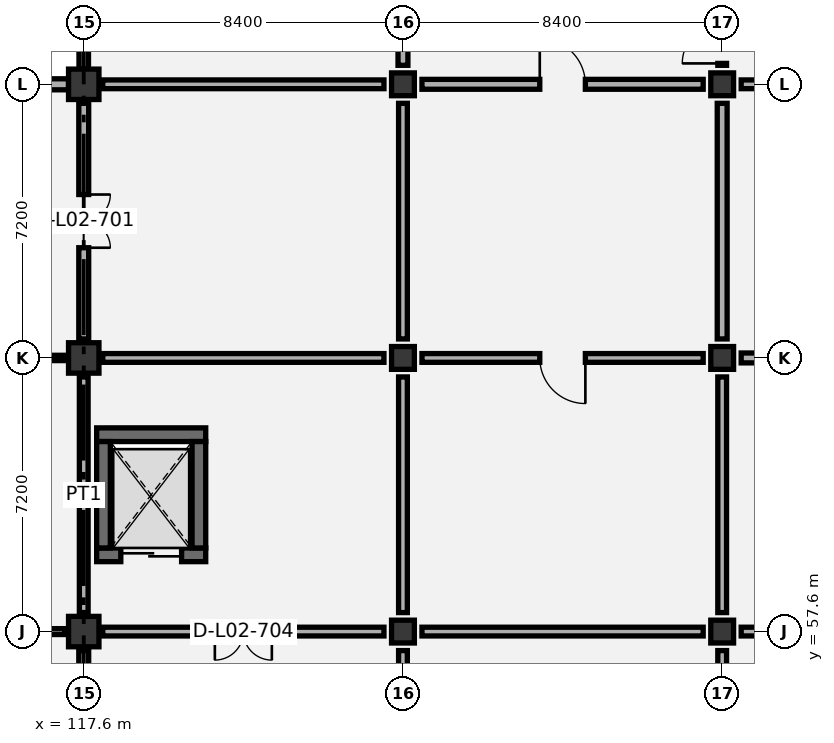
"""IFC4 building model, lengths in metres.
Left out: names, types, materials, properties, quantities, classifications, styles, units other than length and angle.
Written with IfcOpenShell. Run it as: python <this file> out.ifc"""

import sys

from ifc_helpers import new_model, si_unit, direction, frame, frame_2d, origin, origin_2d, place, context, subcontext, project, spatial, rectangle, extrude, element, fill, save


model = new_model("IFC4")
c1 = context("Model", 3, precision=1e-05, world=origin(), true_north=direction((0.0, 1.0)))
c2 = subcontext(c1, "Body", "Model", "MODEL_VIEW")
j1 = project(units=[si_unit("LENGTHUNIT", "METRE"), si_unit("PLANEANGLEUNIT", "RADIAN")], contexts=[c1])
p1 = place(None, origin())
s1 = spatial("IfcSite", under=j1, at=p1, CompositionType="ELEMENT")
p2 = place(p1, origin())
s2 = spatial("IfcBuilding", under=s1, at=p2, CompositionType="ELEMENT")
p3 = place(p2, frame((0.0, 0.0, 11.4)))
s3 = spatial("IfcBuildingStorey", under=s2, at=p3, CompositionType="ELEMENT", Elevation=11.4)
for number, where, z_axis, x_axis in (
    (1, (117.6, 57.6, 0.0), (0.0, 0.0, 1.0), (1.0, 0.0, 0.0)),
    (2, (117.6, 64.8, 0.0), (0.0, 0.0, 1.0), (1.0, 0.0, 0.0)),
    (3, (117.6, 72.0, 0.0), (0.0, 0.0, 1.0), (1.0, 0.0, 0.0)),
):
    element("IfcColumn", number, at=place(p3, frame(where, z_axis=z_axis, x_axis=x_axis)), inside=s3, PredefinedType="COLUMN", context=c2, shape_type="SweptSolid", body=[
        extrude(rectangle(XDim=0.8, YDim=0.8, at=origin_2d()), origin(), (0.0, 0.0, 1.0), 5.4),
    ])
for number, where, z_axis, x_axis in (
    (4, (126.0, 57.6, 0.0), (0.0, 0.0, 1.0), (1.0, 0.0, 0.0)),
    (5, (126.0, 64.8, 0.0), (0.0, 0.0, 1.0), (1.0, 0.0, 0.0)),
    (6, (126.0, 72.0, 0.0), (0.0, 0.0, 1.0), (1.0, 0.0, 0.0)),
    (7, (134.4, 57.6, 0.0), (0.0, 0.0, 1.0), (1.0, 0.0, 0.0)),
    (8, (134.4, 64.8, 0.0), (0.0, 0.0, 1.0), (1.0, 0.0, 0.0)),
    (9, (134.4, 72.0, 0.0), (0.0, 0.0, 1.0), (1.0, 0.0, 0.0)),
):
    element("IfcColumn", number, at=place(p3, frame(where, z_axis=z_axis, x_axis=x_axis)), inside=s3, PredefinedType="COLUMN", context=c2, shape_type="SweptSolid", body=[
        extrude(rectangle(XDim=0.6, YDim=0.6, at=origin_2d()), origin(), (0.0, 0.0, 1.0), 5.4),
    ])
p4 = place(p3, frame((117.94, 62.78, 0.0), z_axis=(0.0, 0.0, 1.0), x_axis=(1.0, 0.0, 0.0)))
e10 = element("IfcWall", 10, at=p4, inside=s3, PredefinedType="SHEAR", context=c2, shape_type="SweptSolid", body=[
    extrude(rectangle(XDim=2.87, YDim=0.36, at=frame_2d((1.435, 0.0))), origin(), (0.0, 0.0, 1.0), 5.1),
])
p5 = place(p3, frame((117.94, 59.62, 0.0), z_axis=(0.0, 0.0, 1.0), x_axis=(1.0, 0.0, 0.0)))
e11 = element("IfcWall", 11, at=p5, inside=s3, PredefinedType="SHEAR", context=c2, shape_type="SweptSolid", body=[
    extrude(rectangle(XDim=2.87, YDim=0.36, at=frame_2d((1.435, 0.0))), origin(), (0.0, 0.0, 1.0), 5.1),
])
p6 = place(p5, frame((0.635, 0.0, 0.0)))
e12 = element("IfcOpeningElement", 12, at=p6, cuts=e11, PredefinedType="OPENING", context=c2, shape_type="SweptSolid", body=[
    extrude(rectangle(XDim=1.6, YDim=2.25, at=frame_2d((0.8, 1.125))), frame((0.0, 0.19, 0.0), z_axis=(0.0, -1.0, 0.0), x_axis=(1.0, 0.0, 0.0)), (0.0, 0.0, 1.0), 0.38),
])
for number, where, z_axis, x_axis in (
    (13, (118.12, 59.8, 0.0), (0.0, 0.0, 1.0), (0.0, 1.0, 0.0)),
    (14, (120.63, 59.8, 0.0), (0.0, 0.0, 1.0), (0.0, 1.0, 0.0)),
):
    element("IfcWall", number, at=place(p3, frame(where, z_axis=z_axis, x_axis=x_axis)), inside=s3, PredefinedType="SHEAR", context=c2, shape_type="SweptSolid", body=[
        extrude(rectangle(XDim=2.8, YDim=0.36, at=frame_2d((1.4, 0.0))), origin(), (0.0, 0.0, 1.0), 5.1),
    ])
p7 = place(p3, frame((109.6, 72.0, 0.0), z_axis=(0.0, 0.0, 1.0), x_axis=(1.0, 0.0, 0.0)))
e15 = element("IfcWall", 15, at=p7, inside=s3, PredefinedType="SOLIDWALL", context=c2, shape_type="SweptSolid", body=[
    extrude(rectangle(XDim=7.6, YDim=0.29, at=frame_2d((3.8, 0.0))), origin(), (0.0, 0.0, 1.0), 4.445),
])
p8 = place(p7, frame((2.3, 0.0, 0.9)))
e16 = element("IfcOpeningElement", 16, at=p8, cuts=e15, PredefinedType="OPENING", context=c2, shape_type="SweptSolid", body=[
    extrude(rectangle(XDim=3.0, YDim=2.1, at=frame_2d((1.5, 1.05))), frame((0.0, 0.155, 0.0), z_axis=(0.0, -1.0, 0.0), x_axis=(1.0, 0.0, 0.0)), (0.0, 0.0, 1.0), 0.31),
])
p9 = place(p3, frame((117.6, 72.4, 0.0), z_axis=(0.0, 0.0, 1.0), x_axis=(0.0, 1.0, 0.0)))
e17 = element("IfcWall", 17, at=p9, inside=s3, PredefinedType="SOLIDWALL", context=c2, shape_type="SweptSolid", body=[
    extrude(rectangle(XDim=6.5, YDim=0.25, at=frame_2d((3.25, 0.0))), origin(), (0.0, 0.0, 1.0), 4.445),
])
p10 = place(p9, frame((1.75, 0.0, 0.9)))
e18 = element("IfcOpeningElement", 18, at=p10, cuts=e17, PredefinedType="OPENING", context=c2, shape_type="SweptSolid", body=[
    extrude(rectangle(XDim=3.0, YDim=2.1, at=frame_2d((1.5, 1.05))), frame((0.0, 0.135, 0.0), z_axis=(0.0, -1.0, 0.0), x_axis=(1.0, 0.0, 0.0)), (0.0, 0.0, 1.0), 0.27),
])
p11 = place(p3, frame((117.6, 50.9, 0.0), z_axis=(0.0, 0.0, 1.0), x_axis=(0.0, 1.0, 0.0)))
e19 = element("IfcWall", 19, at=p11, inside=s3, PredefinedType="PARTITIONING", context=c2, shape_type="SweptSolid", body=[
    extrude(rectangle(XDim=6.2, YDim=0.26, at=frame_2d((3.1, 0.0))), origin(), (0.0, 0.0, 1.0), 4.395),
])
p12 = place(p3, frame((109.7, 57.6, 0.0), z_axis=(0.0, 0.0, 1.0), x_axis=(1.0, 0.0, 0.0)))
e20 = element("IfcWall", 20, at=p12, inside=s3, PredefinedType="PARTITIONING", context=c2, shape_type="SweptSolid", body=[
    extrude(rectangle(XDim=7.4, YDim=0.155, at=frame_2d((3.7, 0.0))), origin(), (0.0, 0.0, 1.0), 4.345),
])
p13 = place(p12, frame((3.0, 0.0, 0.0)))
e21 = element("IfcOpeningElement", 21, at=p13, cuts=e20, PredefinedType="OPENING", context=c2, shape_type="SweptSolid", body=[
    extrude(rectangle(XDim=1.4, YDim=2.15, at=frame_2d((0.7, 1.075))), frame((0.0, 0.087, 0.0), z_axis=(0.0, -1.0, 0.0), x_axis=(1.0, 0.0, 0.0)), (0.0, 0.0, 1.0), 0.175),
])
p14 = place(p3, frame((117.6, 58.1, 0.0), z_axis=(0.0, 0.0, 1.0), x_axis=(0.0, 1.0, 0.0)))
e22 = element("IfcWall", 22, at=p14, inside=s3, PredefinedType="PARTITIONING", context=c2, shape_type="SweptSolid", body=[
    extrude(rectangle(XDim=6.2, YDim=0.23, at=frame_2d((3.1, 0.0))), origin(), (0.0, 0.0, 1.0), 4.695),
])
p15 = place(p3, frame((109.7, 64.8, 0.0), z_axis=(0.0, 0.0, 1.0), x_axis=(1.0, 0.0, 0.0)))
e23 = element("IfcWall", 23, at=p15, inside=s3, PredefinedType="PARTITIONING", context=c2, shape_type="SweptSolid", body=[
    extrude(rectangle(XDim=7.4, YDim=0.14, at=frame_2d((3.7, 0.0))), origin(), (0.0, 0.0, 1.0), 4.345),
])
p16 = place(p15, frame((2.85, 0.0, 0.0)))
e24 = element("IfcOpeningElement", 24, at=p16, cuts=e23, PredefinedType="OPENING", context=c2, shape_type="SweptSolid", body=[
    extrude(rectangle(XDim=1.7, YDim=2.25, at=frame_2d((0.85, 1.125))), frame((0.0, 0.08, 0.0), z_axis=(0.0, -1.0, 0.0), x_axis=(1.0, 0.0, 0.0)), (0.0, 0.0, 1.0), 0.16),
])
p17 = place(p3, frame((117.6, 65.3, 0.0), z_axis=(0.0, 0.0, 1.0), x_axis=(0.0, 1.0, 0.0)))
e25 = element("IfcWall", 25, at=p17, inside=s3, PredefinedType="PARTITIONING", context=c2, shape_type="SweptSolid", body=[
    extrude(rectangle(XDim=6.2, YDim=0.26, at=frame_2d((3.1, 0.0))), origin(), (0.0, 0.0, 1.0), 4.395),
])
p18 = place(p17, frame((2.4, 0.0, 0.0)))
e26 = element("IfcOpeningElement", 26, at=p18, cuts=e25, PredefinedType="OPENING", context=c2, shape_type="SweptSolid", body=[
    extrude(rectangle(XDim=1.4, YDim=2.15, at=frame_2d((0.7, 1.075))), frame((0.0, 0.14, 0.0), z_axis=(0.0, -1.0, 0.0), x_axis=(1.0, 0.0, 0.0)), (0.0, 0.0, 1.0), 0.28),
])
p19 = place(p3, frame((126.0, 50.9, 0.0), z_axis=(0.0, 0.0, 1.0), x_axis=(0.0, 1.0, 0.0)))
e27 = element("IfcWall", 27, at=p19, inside=s3, PredefinedType="PARTITIONING", context=c2, shape_type="SweptSolid", body=[
    extrude(rectangle(XDim=6.2, YDim=0.23, at=frame_2d((3.1, 0.0))), origin(), (0.0, 0.0, 1.0), 4.695),
])
p20 = place(p19, frame((0.05, 0.0, 0.0)))
e28 = element("IfcOpeningElement", 28, at=p20, cuts=e27, PredefinedType="OPENING", context=c2, shape_type="SweptSolid", body=[
    extrude(rectangle(XDim=1.05, YDim=2.15, at=frame_2d((0.525, 1.075))), frame((0.0, 0.125, 0.0), z_axis=(0.0, -1.0, 0.0), x_axis=(1.0, 0.0, 0.0)), (0.0, 0.0, 1.0), 0.25),
])
p21 = place(p3, frame((118.1, 57.6, 0.0), z_axis=(0.0, 0.0, 1.0), x_axis=(1.0, 0.0, 0.0)))
e29 = element("IfcWall", 29, at=p21, inside=s3, PredefinedType="PARTITIONING", context=c2, shape_type="SweptSolid", body=[
    extrude(rectangle(XDim=7.4, YDim=0.23, at=frame_2d((3.7, 0.0))), origin(), (0.0, 0.0, 1.0), 4.345),
])
p22 = place(p21, frame((2.95, 0.0, 0.0)))
e30 = element("IfcOpeningElement", 30, at=p22, cuts=e29, PredefinedType="OPENING", context=c2, shape_type="SweptSolid", body=[
    extrude(rectangle(XDim=1.5, YDim=2.15, at=frame_2d((0.75, 1.075))), frame((0.0, 0.125, 0.0), z_axis=(0.0, -1.0, 0.0), x_axis=(1.0, 0.0, 0.0)), (0.0, 0.0, 1.0), 0.25),
])
p23 = place(p3, frame((126.0, 58.1, 0.0), z_axis=(0.0, 0.0, 1.0), x_axis=(0.0, 1.0, 0.0)))
e31 = element("IfcWall", 31, at=p23, inside=s3, PredefinedType="PARTITIONING", context=c2, shape_type="SweptSolid", body=[
    extrude(rectangle(XDim=6.2, YDim=0.23, at=frame_2d((3.1, 0.0))), origin(), (0.0, 0.0, 1.0), 4.395),
])
p24 = place(p3, frame((118.1, 64.8, 0.0), z_axis=(0.0, 0.0, 1.0), x_axis=(1.0, 0.0, 0.0)))
e32 = element("IfcWall", 32, at=p24, inside=s3, PredefinedType="PARTITIONING", context=c2, shape_type="SweptSolid", body=[
    extrude(rectangle(XDim=7.4, YDim=0.23, at=frame_2d((3.7, 0.0))), origin(), (0.0, 0.0, 1.0), 4.345),
])
p25 = place(p3, frame((126.0, 65.3, 0.0), z_axis=(0.0, 0.0, 1.0), x_axis=(0.0, 1.0, 0.0)))
e33 = element("IfcWall", 33, at=p25, inside=s3, PredefinedType="PARTITIONING", context=c2, shape_type="SweptSolid", body=[
    extrude(rectangle(XDim=6.2, YDim=0.23, at=frame_2d((3.1, 0.0))), origin(), (0.0, 0.0, 1.0), 4.805),
])
p26 = place(p3, frame((118.1, 72.0, 0.0), z_axis=(0.0, 0.0, 1.0), x_axis=(1.0, 0.0, 0.0)))
e34 = element("IfcWall", 34, at=p26, inside=s3, PredefinedType="PARTITIONING", context=c2, shape_type="SweptSolid", body=[
    extrude(rectangle(XDim=7.4, YDim=0.23, at=frame_2d((3.7, 0.0))), origin(), (0.0, 0.0, 1.0), 4.345),
])
p27 = place(p3, frame((126.0, 72.5, 0.0), z_axis=(0.0, 0.0, 1.0), x_axis=(0.0, 1.0, 0.0)))
e35 = element("IfcWall", 35, at=p27, inside=s3, PredefinedType="PARTITIONING", context=c2, shape_type="SweptSolid", body=[
    extrude(rectangle(XDim=6.2, YDim=0.26, at=frame_2d((3.1, 0.0))), origin(), (0.0, 0.0, 1.0), 4.395),
])
p28 = place(p27, frame((2.5, 0.0, 0.0)))
e36 = element("IfcOpeningElement", 36, at=p28, cuts=e35, PredefinedType="OPENING", context=c2, shape_type="SweptSolid", body=[
    extrude(rectangle(XDim=1.2, YDim=2.1, at=frame_2d((0.6, 1.05))), frame((0.0, 0.14, 0.0), z_axis=(0.0, -1.0, 0.0), x_axis=(1.0, 0.0, 0.0)), (0.0, 0.0, 1.0), 0.28),
])
p29 = place(p3, frame((134.4, 50.9, 0.0), z_axis=(0.0, 0.0, 1.0), x_axis=(0.0, 1.0, 0.0)))
e37 = element("IfcWall", 37, at=p29, inside=s3, PredefinedType="PARTITIONING", context=c2, shape_type="SweptSolid", body=[
    extrude(rectangle(XDim=6.2, YDim=0.23, at=frame_2d((3.1, 0.0))), origin(), (0.0, 0.0, 1.0), 4.395),
])
p30 = place(p3, frame((126.5, 57.6, 0.0), z_axis=(0.0, 0.0, 1.0), x_axis=(1.0, 0.0, 0.0)))
e38 = element("IfcWall", 38, at=p30, inside=s3, PredefinedType="PARTITIONING", context=c2, shape_type="SweptSolid", body=[
    extrude(rectangle(XDim=7.4, YDim=0.23, at=frame_2d((3.7, 0.0))), origin(), (0.0, 0.0, 1.0), 4.345),
])
p31 = place(p3, frame((134.4, 58.1, 0.0), z_axis=(0.0, 0.0, 1.0), x_axis=(0.0, 1.0, 0.0)))
e39 = element("IfcWall", 39, at=p31, inside=s3, PredefinedType="PARTITIONING", context=c2, shape_type="SweptSolid", body=[
    extrude(rectangle(XDim=6.2, YDim=0.23, at=frame_2d((3.1, 0.0))), origin(), (0.0, 0.0, 1.0), 4.805),
])
p32 = place(p3, frame((126.5, 64.8, 0.0), z_axis=(0.0, 0.0, 1.0), x_axis=(1.0, 0.0, 0.0)))
e40 = element("IfcWall", 40, at=p32, inside=s3, PredefinedType="PARTITIONING", context=c2, shape_type="SweptSolid", body=[
    extrude(rectangle(XDim=7.4, YDim=0.23, at=frame_2d((3.7, 0.0))), origin(), (0.0, 0.0, 1.0), 4.345),
])
p33 = place(p32, frame((3.1, 0.0, 0.0)))
e41 = element("IfcOpeningElement", 41, at=p33, cuts=e40, PredefinedType="OPENING", context=c2, shape_type="SweptSolid", body=[
    extrude(rectangle(XDim=1.2, YDim=2.1, at=frame_2d((0.6, 1.05))), frame((0.0, 0.125, 0.0), z_axis=(0.0, -1.0, 0.0), x_axis=(1.0, 0.0, 0.0)), (0.0, 0.0, 1.0), 0.25),
])
p34 = place(p3, frame((134.4, 65.3, 0.0), z_axis=(0.0, 0.0, 1.0), x_axis=(0.0, 1.0, 0.0)))
e42 = element("IfcWall", 42, at=p34, inside=s3, PredefinedType="PARTITIONING", context=c2, shape_type="SweptSolid", body=[
    extrude(rectangle(XDim=6.2, YDim=0.26, at=frame_2d((3.1, 0.0))), origin(), (0.0, 0.0, 1.0), 4.395),
])
p35 = place(p3, frame((126.5, 72.0, 0.0), z_axis=(0.0, 0.0, 1.0), x_axis=(1.0, 0.0, 0.0)))
e43 = element("IfcWall", 43, at=p35, inside=s3, PredefinedType="PARTITIONING", context=c2, shape_type="SweptSolid", body=[
    extrude(rectangle(XDim=7.4, YDim=0.26, at=frame_2d((3.7, 0.0))), origin(), (0.0, 0.0, 1.0), 4.345),
])
p36 = place(p35, frame((3.1, 0.0, 0.0)))
e44 = element("IfcOpeningElement", 44, at=p36, cuts=e43, PredefinedType="OPENING", context=c2, shape_type="SweptSolid", body=[
    extrude(rectangle(XDim=1.2, YDim=2.1, at=frame_2d((0.6, 1.05))), frame((0.0, 0.14, 0.0), z_axis=(0.0, -1.0, 0.0), x_axis=(1.0, 0.0, 0.0)), (0.0, 0.0, 1.0), 0.28),
])
p37 = place(p3, frame((134.4, 72.5, 0.0), z_axis=(0.0, 0.0, 1.0), x_axis=(0.0, 1.0, 0.0)))
e45 = element("IfcWall", 45, at=p37, inside=s3, PredefinedType="PARTITIONING", context=c2, shape_type="SweptSolid", body=[
    extrude(rectangle(XDim=6.2, YDim=0.23, at=frame_2d((3.1, 0.0))), origin(), (0.0, 0.0, 1.0), 4.595),
])
p38 = place(p37, frame((0.05, 0.0, 0.0)))
e46 = element("IfcOpeningElement", 46, at=p38, cuts=e45, PredefinedType="OPENING", context=c2, shape_type="SweptSolid", body=[
    extrude(rectangle(XDim=1.05, YDim=2.15, at=frame_2d((0.525, 1.075))), frame((0.0, 0.125, 0.0), z_axis=(0.0, -1.0, 0.0), x_axis=(1.0, 0.0, 0.0)), (0.0, 0.0, 1.0), 0.25),
])
p39 = place(p3, frame((134.9, 57.6, 0.0), z_axis=(0.0, 0.0, 1.0), x_axis=(1.0, 0.0, 0.0)))
e47 = element("IfcWall", 47, at=p39, inside=s3, PredefinedType="PARTITIONING", context=c2, shape_type="SweptSolid", body=[
    extrude(rectangle(XDim=7.4, YDim=0.23, at=frame_2d((3.7, 0.0))), origin(), (0.0, 0.0, 1.0), 4.345),
])
p40 = place(p39, frame((3.1, 0.0, 0.0)))
e48 = element("IfcOpeningElement", 48, at=p40, cuts=e47, PredefinedType="OPENING", context=c2, shape_type="SweptSolid", body=[
    extrude(rectangle(XDim=1.2, YDim=2.1, at=frame_2d((0.6, 1.05))), frame((0.0, 0.125, 0.0), z_axis=(0.0, -1.0, 0.0), x_axis=(1.0, 0.0, 0.0)), (0.0, 0.0, 1.0), 0.25),
])
p41 = place(p3, frame((134.9, 64.8, 0.0), z_axis=(0.0, 0.0, 1.0), x_axis=(1.0, 0.0, 0.0)))
e49 = element("IfcWall", 49, at=p41, inside=s3, PredefinedType="PARTITIONING", context=c2, shape_type="SweptSolid", body=[
    extrude(rectangle(XDim=7.4, YDim=0.26, at=frame_2d((3.7, 0.0))), origin(), (0.0, 0.0, 1.0), 4.345),
])
p42 = place(p41, frame((3.1, 0.0, 0.0)))
e50 = element("IfcOpeningElement", 50, at=p42, cuts=e49, PredefinedType="OPENING", context=c2, shape_type="SweptSolid", body=[
    extrude(rectangle(XDim=1.2, YDim=2.1, at=frame_2d((0.6, 1.05))), frame((0.0, 0.14, 0.0), z_axis=(0.0, -1.0, 0.0), x_axis=(1.0, 0.0, 0.0)), (0.0, 0.0, 1.0), 0.28),
])
p43 = place(p3, frame((134.9, 72.0, 0.0), z_axis=(0.0, 0.0, 1.0), x_axis=(1.0, 0.0, 0.0)))
e51 = element("IfcWall", 51, at=p43, inside=s3, PredefinedType="PARTITIONING", context=c2, shape_type="SweptSolid", body=[
    extrude(rectangle(XDim=7.4, YDim=0.23, at=frame_2d((3.7, 0.0))), origin(), (0.0, 0.0, 1.0), 4.345),
])
p44 = place(p43, frame((2.95, 0.0, 0.0)))
e52 = element("IfcOpeningElement", 52, at=p44, cuts=e51, PredefinedType="OPENING", context=c2, shape_type="SweptSolid", body=[
    extrude(rectangle(XDim=1.5, YDim=2.15, at=frame_2d((0.75, 1.075))), frame((0.0, 0.125, 0.0), z_axis=(0.0, -1.0, 0.0), x_axis=(1.0, 0.0, 0.0)), (0.0, 0.0, 1.0), 0.25),
])
p45 = place(p6, origin())
e53 = element("IfcDoor", 53, at=p45, inside=s3, OperationType="DOUBLE_DOOR_SLIDING", PredefinedType="DOOR", context=c2, shape_type="SweptSolid", body=[
    extrude(rectangle(XDim=1.6, YDim=2.25, at=frame_2d((0.8, 1.125))), frame((0.0, 0.025, 0.0), z_axis=(0.0, -1.0, 0.0), x_axis=(1.0, 0.0, 0.0)), (0.0, 0.0, 1.0), 0.05),
])
fill(e12, e53)
p46 = place(p18, frame((1.4, 0.0, 0.0), z_axis=(0.0, 0.0, 1.0), x_axis=(-1.0, 0.0, 0.0)))
e54 = element("IfcDoor", 54, at=p46, inside=s3, OperationType="DOUBLE_DOOR_SINGLE_SWING", PredefinedType="DOOR", context=c2, shape_type="SweptSolid", body=[
    extrude(rectangle(XDim=1.4, YDim=2.15, at=frame_2d((0.7, 1.075))), frame((0.0, 0.025, 0.0), z_axis=(0.0, -1.0, 0.0), x_axis=(1.0, 0.0, 0.0)), (0.0, 0.0, 1.0), 0.05),
])
fill(e26, e54)
p47 = place(p22, frame((1.5, 0.0, 0.0), z_axis=(0.0, 0.0, 1.0), x_axis=(-1.0, 0.0, 0.0)))
e55 = element("IfcDoor", 55, at=p47, inside=s3, OperationType="DOUBLE_DOOR_SINGLE_SWING", PredefinedType="DOOR", context=c2, shape_type="SweptSolid", body=[
    extrude(rectangle(XDim=1.5, YDim=2.15, at=frame_2d((0.75, 1.075))), frame((0.0, 0.025, 0.0), z_axis=(0.0, -1.0, 0.0), x_axis=(1.0, 0.0, 0.0)), (0.0, 0.0, 1.0), 0.05),
])
fill(e30, e55)
p48 = place(p33, frame((1.2, 0.0, 0.0), z_axis=(0.0, 0.0, 1.0), x_axis=(-1.0, 0.0, 0.0)))
e56 = element("IfcDoor", 56, at=p48, inside=s3, OperationType="SINGLE_SWING_LEFT", PredefinedType="DOOR", context=c2, shape_type="SweptSolid", body=[
    extrude(rectangle(XDim=1.2, YDim=2.1, at=frame_2d((0.6, 1.05))), frame((0.0, 0.025, 0.0), z_axis=(0.0, -1.0, 0.0), x_axis=(1.0, 0.0, 0.0)), (0.0, 0.0, 1.0), 0.05),
])
fill(e41, e56)
p49 = place(p36, origin())
e57 = element("IfcDoor", 57, at=p49, inside=s3, OperationType="SINGLE_SWING_LEFT", PredefinedType="DOOR", context=c2, shape_type="SweptSolid", body=[
    extrude(rectangle(XDim=1.2, YDim=2.1, at=frame_2d((0.6, 1.05))), frame((0.0, 0.025, 0.0), z_axis=(0.0, -1.0, 0.0), x_axis=(1.0, 0.0, 0.0)), (0.0, 0.0, 1.0), 0.05),
])
fill(e44, e57)
p50 = place(p38, origin())
e58 = element("IfcDoor", 58, at=p50, inside=s3, OperationType="SINGLE_SWING_LEFT", PredefinedType="DOOR", context=c2, shape_type="SweptSolid", body=[
    extrude(rectangle(XDim=1.05, YDim=2.15, at=frame_2d((0.525, 1.075))), frame((0.0, 0.025, 0.0), z_axis=(0.0, -1.0, 0.0), x_axis=(1.0, 0.0, 0.0)), (0.0, 0.0, 1.0), 0.05),
])
fill(e46, e58)
save(model, sys.argv[1])
